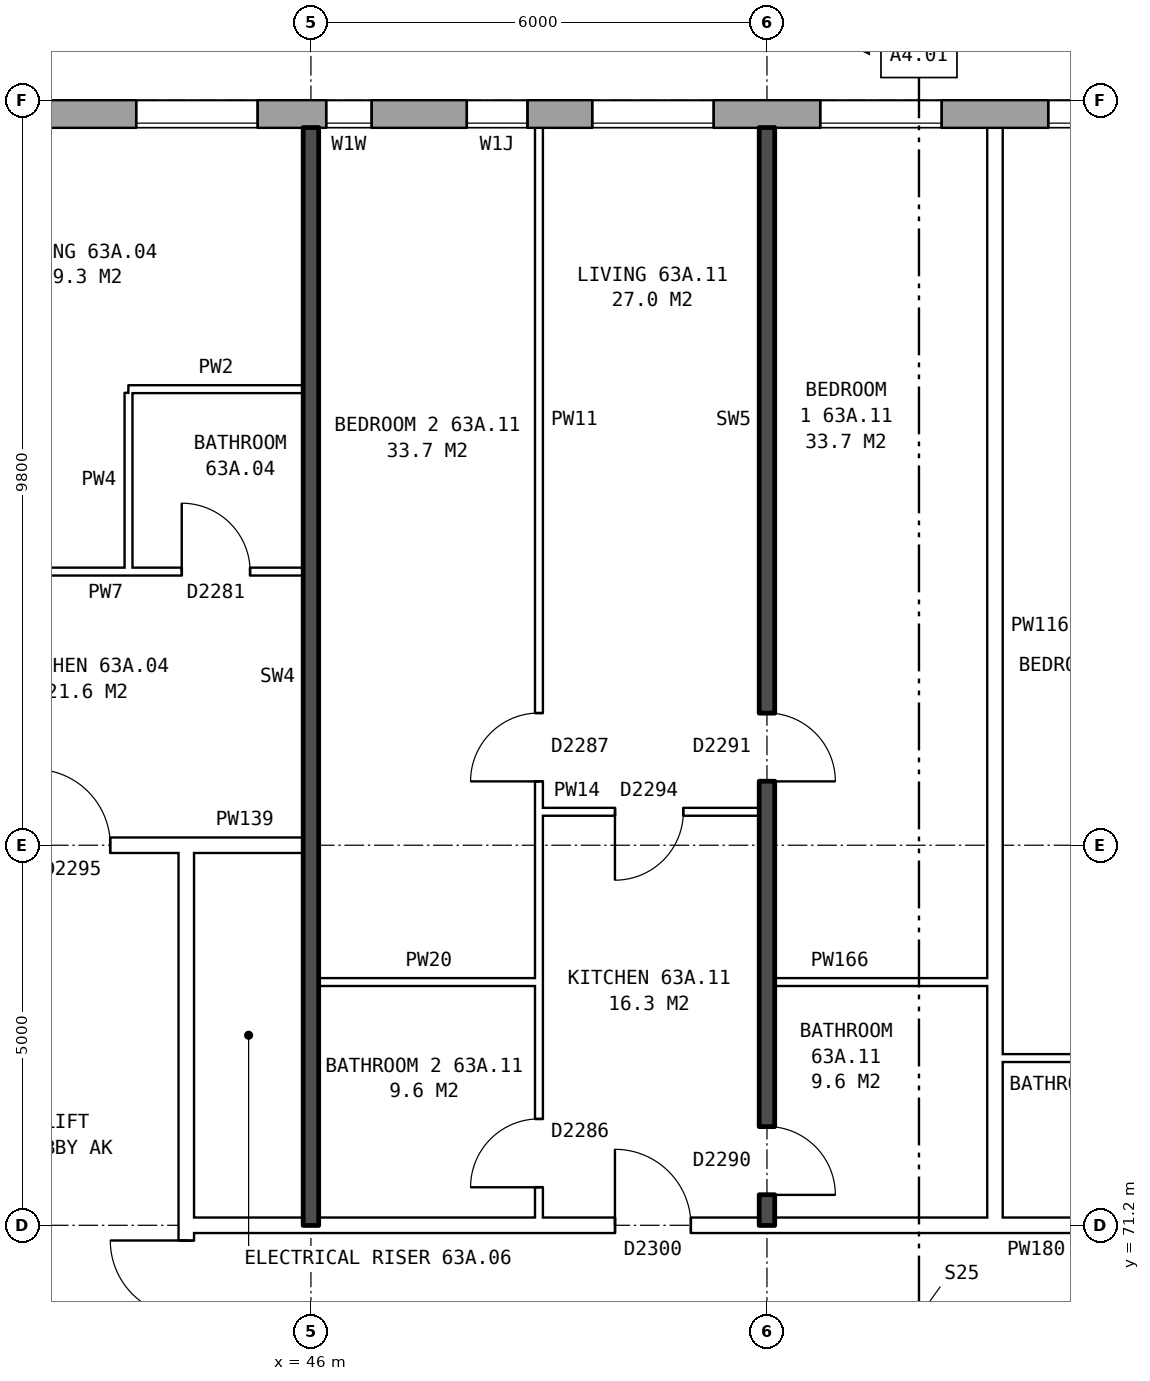
"""IFC4 building model, lengths in metres.
Left out: names, types, materials, properties, quantities, classifications, styles, units other than length and angle.
Written with IfcOpenShell. Run it as: python <this file> out.ifc"""

import sys

from ifc_helpers import new_model, si_unit, direction, frame, frame_2d, origin, place, context, subcontext, project, spatial, rectangle, extrude, element, fill, save


model = new_model("IFC4")
c1 = context("Model", 3, precision=1e-05, world=origin(), true_north=direction((0.0, 1.0)))
c2 = subcontext(c1, "Body", "Model", "MODEL_VIEW")
j1 = project(units=[si_unit("LENGTHUNIT", "METRE"), si_unit("PLANEANGLEUNIT", "RADIAN")], contexts=[c1])
p1 = place(None, origin())
s1 = spatial("IfcSite", under=j1, at=p1, CompositionType="ELEMENT")
p2 = place(p1, origin())
s2 = spatial("IfcBuilding", under=s1, at=p2, CompositionType="ELEMENT")
p3 = place(p2, frame((0.0, 0.0, 224.5)))
s3 = spatial("IfcBuildingStorey", under=s2, at=p3, CompositionType="ELEMENT", Elevation=224.5)
p4 = place(p3, frame((74.95, 85.82, 0.0), z_axis=(0.0, 0.0, 1.0), x_axis=(-1.0, 0.0, 0.0)))
e1 = element("IfcWall", 1, at=p4, inside=s3, PredefinedType="STANDARD", context=c2, shape_type="SweptSolid", body=[
    extrude(rectangle(XDim=39.875, YDim=0.36, at=frame_2d((19.938, 0.0))), origin(), (0.0, 0.0, 1.0), 2.85),
])
p5 = place(p4, frame((2.65, 0.0, 0.8)))
e2 = element("IfcOpeningElement", 2, at=p5, cuts=e1, PredefinedType="OPENING", context=c2, shape_type="SweptSolid", body=[
    extrude(rectangle(XDim=1.6, YDim=1.8, at=frame_2d((0.8, 0.9))), frame((0.0, 0.19, 0.0), z_axis=(0.0, -1.0, 0.0), x_axis=(1.0, 0.0, 0.0)), (0.0, 0.0, 1.0), 0.38),
])
p6 = place(p4, frame((5.65, 0.0, 0.8)))
e3 = element("IfcOpeningElement", 3, at=p6, cuts=e1, PredefinedType="OPENING", context=c2, shape_type="SweptSolid", body=[
    extrude(rectangle(XDim=1.6, YDim=1.8, at=frame_2d((0.8, 0.9))), frame((0.0, 0.19, 0.0), z_axis=(0.0, -1.0, 0.0), x_axis=(1.0, 0.0, 0.0)), (0.0, 0.0, 1.0), 0.38),
])
p7 = place(p4, frame((8.65, 0.0, 0.8)))
e4 = element("IfcOpeningElement", 4, at=p7, cuts=e1, PredefinedType="OPENING", context=c2, shape_type="SweptSolid", body=[
    extrude(rectangle(XDim=1.6, YDim=1.8, at=frame_2d((0.8, 0.9))), frame((0.0, 0.19, 0.0), z_axis=(0.0, -1.0, 0.0), x_axis=(1.0, 0.0, 0.0)), (0.0, 0.0, 1.0), 0.38),
])
p8 = place(p4, frame((11.65, 0.0, 0.8)))
e5 = element("IfcOpeningElement", 5, at=p8, cuts=e1, PredefinedType="OPENING", context=c2, shape_type="SweptSolid", body=[
    extrude(rectangle(XDim=1.6, YDim=1.8, at=frame_2d((0.8, 0.9))), frame((0.0, 0.19, 0.0), z_axis=(0.0, -1.0, 0.0), x_axis=(1.0, 0.0, 0.0)), (0.0, 0.0, 1.0), 0.38),
])
p9 = place(p4, frame((15.55, 0.0, 0.8)))
e6 = element("IfcOpeningElement", 6, at=p9, cuts=e1, PredefinedType="OPENING", context=c2, shape_type="SweptSolid", body=[
    extrude(rectangle(XDim=1.2, YDim=1.8, at=frame_2d((0.6, 0.9))), frame((0.0, 0.19, 0.0), z_axis=(0.0, -1.0, 0.0), x_axis=(1.0, 0.0, 0.0)), (0.0, 0.0, 1.0), 0.38),
])
p10 = place(p4, frame((17.65, 0.0, 0.8)))
e7 = element("IfcOpeningElement", 7, at=p10, cuts=e1, PredefinedType="OPENING", context=c2, shape_type="SweptSolid", body=[
    extrude(rectangle(XDim=1.6, YDim=1.8, at=frame_2d((0.8, 0.9))), frame((0.0, 0.19, 0.0), z_axis=(0.0, -1.0, 0.0), x_axis=(1.0, 0.0, 0.0)), (0.0, 0.0, 1.0), 0.38),
])
p11 = place(p4, frame((20.65, 0.0, 0.8)))
e8 = element("IfcOpeningElement", 8, at=p11, cuts=e1, PredefinedType="OPENING", context=c2, shape_type="SweptSolid", body=[
    extrude(rectangle(XDim=1.6, YDim=1.8, at=frame_2d((0.8, 0.9))), frame((0.0, 0.19, 0.0), z_axis=(0.0, -1.0, 0.0), x_axis=(1.0, 0.0, 0.0)), (0.0, 0.0, 1.0), 0.38),
])
p12 = place(p4, frame((23.65, 0.0, 0.8)))
e9 = element("IfcOpeningElement", 9, at=p12, cuts=e1, PredefinedType="OPENING", context=c2, shape_type="SweptSolid", body=[
    extrude(rectangle(XDim=1.6, YDim=1.8, at=frame_2d((0.8, 0.9))), frame((0.0, 0.19, 0.0), z_axis=(0.0, -1.0, 0.0), x_axis=(1.0, 0.0, 0.0)), (0.0, 0.0, 1.0), 0.38),
])
p13 = place(p4, frame((26.1, 0.0, 0.25)))
e10 = element("IfcOpeningElement", 10, at=p13, cuts=e1, PredefinedType="OPENING", context=c2, shape_type="SweptSolid", body=[
    extrude(rectangle(XDim=0.8, YDim=1.5, at=frame_2d((0.4, 0.75))), frame((0.0, 0.19, 0.0), z_axis=(0.0, -1.0, 0.0), x_axis=(1.0, 0.0, 0.0)), (0.0, 0.0, 1.0), 0.38),
])
p14 = place(p4, frame((29.65, 0.0, 0.8)))
e11 = element("IfcOpeningElement", 11, at=p14, cuts=e1, PredefinedType="OPENING", context=c2, shape_type="SweptSolid", body=[
    extrude(rectangle(XDim=1.6, YDim=1.8, at=frame_2d((0.8, 0.9))), frame((0.0, 0.19, 0.0), z_axis=(0.0, -1.0, 0.0), x_axis=(1.0, 0.0, 0.0)), (0.0, 0.0, 1.0), 0.38),
])
p15 = place(p4, frame((32.65, 0.0, 0.8)))
e12 = element("IfcOpeningElement", 12, at=p15, cuts=e1, PredefinedType="OPENING", context=c2, shape_type="SweptSolid", body=[
    extrude(rectangle(XDim=1.6, YDim=1.8, at=frame_2d((0.8, 0.9))), frame((0.0, 0.19, 0.0), z_axis=(0.0, -1.0, 0.0), x_axis=(1.0, 0.0, 0.0)), (0.0, 0.0, 1.0), 0.38),
])
p16 = place(p4, frame((35.65, 0.0, 0.8)))
e13 = element("IfcOpeningElement", 13, at=p16, cuts=e1, PredefinedType="OPENING", context=c2, shape_type="SweptSolid", body=[
    extrude(rectangle(XDim=1.6, YDim=1.8, at=frame_2d((0.8, 0.9))), frame((0.0, 0.19, 0.0), z_axis=(0.0, -1.0, 0.0), x_axis=(1.0, 0.0, 0.0)), (0.0, 0.0, 1.0), 0.38),
])
p17 = place(p4, frame((28.15, 0.0, 1.65)))
e14 = element("IfcOpeningElement", 14, at=p17, cuts=e1, PredefinedType="OPENING", context=c2, shape_type="SweptSolid", body=[
    extrude(rectangle(XDim=0.6, YDim=0.9, at=frame_2d((0.3, 0.45))), frame((0.0, 0.19, 0.0), z_axis=(0.0, -1.0, 0.0), x_axis=(1.0, 0.0, 0.0)), (0.0, 0.0, 1.0), 0.38),
])
p18 = place(p3, frame((44.36, 63.9, 0.0), z_axis=(0.0, 0.0, 1.0), x_axis=(0.0, 1.0, 0.0)))
e15 = element("IfcWall", 15, at=p18, inside=s3, PredefinedType="PARTITIONING", context=c2, shape_type="SweptSolid", body=[
    extrude(rectangle(XDim=12.2, YDim=0.2, at=frame_2d((6.1, 0.0))), origin(), (0.0, 0.0, 1.0), 2.85),
])
p19 = place(p18, frame((5.1, 0.0, 0.0)))
e16 = element("IfcOpeningElement", 16, at=p19, cuts=e15, PredefinedType="OPENING", context=c2, shape_type="SweptSolid", body=[
    extrude(rectangle(XDim=2.0, YDim=2.1, at=frame_2d((1.0, 1.05))), frame((0.0, 0.11, 0.0), z_axis=(0.0, -1.0, 0.0), x_axis=(1.0, 0.0, 0.0)), (0.0, 0.0, 1.0), 0.22),
])
p20 = place(p3, frame((44.36, 71.2, 0.0), z_axis=(0.0, 0.0, 1.0), x_axis=(1.0, 0.0, 0.0)))
e17 = element("IfcWall", 17, at=p20, inside=s3, PredefinedType="PARTITIONING", context=c2, shape_type="SweptSolid", body=[
    extrude(rectangle(XDim=19.28, YDim=0.2, at=frame_2d((9.64, 0.0))), origin(), (0.0, 0.0, 1.0), 2.85),
])
p21 = place(p20, frame((14.64, 0.0, 0.0)))
e18 = element("IfcOpeningElement", 18, at=p21, cuts=e17, PredefinedType="OPENING", context=c2, shape_type="SweptSolid", body=[
    extrude(rectangle(XDim=1.0, YDim=2.1, at=frame_2d((0.5, 1.05))), frame((0.0, 0.11, 0.0), z_axis=(0.0, -1.0, 0.0), x_axis=(1.0, 0.0, 0.0)), (0.0, 0.0, 1.0), 0.22),
])
p22 = place(p20, frame((5.64, 0.0, 0.0)))
e19 = element("IfcOpeningElement", 19, at=p22, cuts=e17, PredefinedType="OPENING", context=c2, shape_type="SweptSolid", body=[
    extrude(rectangle(XDim=1.0, YDim=2.1, at=frame_2d((0.5, 1.05))), frame((0.0, 0.11, 0.0), z_axis=(0.0, -1.0, 0.0), x_axis=(1.0, 0.0, 0.0)), (0.0, 0.0, 1.0), 0.22),
])
p23 = place(p3, frame((55.1, 73.4, 0.0), z_axis=(0.0, 0.0, 1.0), x_axis=(1.0, 0.0, 0.0)))
e20 = element("IfcWall", 20, at=p23, inside=s3, PredefinedType="PARTITIONING", context=c2, shape_type="SweptSolid", body=[
    extrude(rectangle(XDim=2.8, YDim=0.1, at=frame_2d((1.4, 0.0))), origin(), (0.0, 0.0, 1.0), 2.85),
])
p24 = place(p3, frame((46.1, 74.4, 0.0), z_axis=(0.0, 0.0, 1.0), x_axis=(1.0, 0.0, 0.0)))
e21 = element("IfcWall", 21, at=p24, inside=s3, PredefinedType="PARTITIONING", context=c2, shape_type="SweptSolid", body=[
    extrude(rectangle(XDim=2.9, YDim=0.1, at=frame_2d((1.45, 0.0))), origin(), (0.0, 0.0, 1.0), 2.85),
])
p25 = place(p3, frame((52.1, 74.4, 0.0), z_axis=(0.0, 0.0, 1.0), x_axis=(1.0, 0.0, 0.0)))
e22 = element("IfcWall", 22, at=p25, inside=s3, PredefinedType="PARTITIONING", context=c2, shape_type="SweptSolid", body=[
    extrude(rectangle(XDim=2.8, YDim=0.1, at=frame_2d((1.4, 0.0))), origin(), (0.0, 0.0, 1.0), 2.85),
])
p26 = place(p3, frame((41.36, 76.2, 0.0), z_axis=(0.0, 0.0, 1.0), x_axis=(1.0, 0.0, 0.0)))
e23 = element("IfcWall", 23, at=p26, inside=s3, PredefinedType="PARTITIONING", context=c2, shape_type="SweptSolid", body=[
    extrude(rectangle(XDim=3.0, YDim=0.2, at=frame_2d((1.5, 0.0))), origin(), (0.0, 0.0, 1.0), 2.85),
])
p27 = place(p26, frame((1.0, 0.0, 0.0)))
e24 = element("IfcOpeningElement", 24, at=p27, cuts=e23, PredefinedType="OPENING", context=c2, shape_type="SweptSolid", body=[
    extrude(rectangle(XDim=1.0, YDim=2.1, at=frame_2d((0.5, 1.05))), frame((0.0, 0.11, 0.0), z_axis=(0.0, -1.0, 0.0), x_axis=(1.0, 0.0, 0.0)), (0.0, 0.0, 1.0), 0.22),
])
p28 = place(p3, frame((44.36, 76.2, 0.0), z_axis=(0.0, 0.0, 1.0), x_axis=(1.0, 0.0, 0.0)))
e25 = element("IfcWall", 25, at=p28, inside=s3, PredefinedType="PARTITIONING", context=c2, shape_type="SweptSolid", body=[
    extrude(rectangle(XDim=1.54, YDim=0.2, at=frame_2d((0.77, 0.0))), origin(), (0.0, 0.0, 1.0), 2.85),
])
p29 = place(p3, frame((49.0, 76.64, 0.0), z_axis=(0.0, 0.0, 1.0), x_axis=(1.0, 0.0, 0.0)))
e26 = element("IfcWall", 26, at=p29, inside=s3, PredefinedType="PARTITIONING", context=c2, shape_type="SweptSolid", body=[
    extrude(rectangle(XDim=2.9, YDim=0.1, at=frame_2d((1.45, 0.0))), origin(), (0.0, 0.0, 1.0), 2.85),
])
p30 = place(p29, frame((1.0, 0.0, 0.0)))
e27 = element("IfcOpeningElement", 27, at=p30, cuts=e26, PredefinedType="OPENING", context=c2, shape_type="SweptSolid", body=[
    extrude(rectangle(XDim=0.9, YDim=2.1, at=frame_2d((0.45, 1.05))), frame((0.0, 0.06, 0.0), z_axis=(0.0, -1.0, 0.0), x_axis=(1.0, 0.0, 0.0)), (0.0, 0.0, 1.0), 0.12),
])
p31 = place(p3, frame((40.1, 79.8, 0.0), z_axis=(0.0, 0.0, 1.0), x_axis=(1.0, 0.0, 0.0)))
e28 = element("IfcWall", 28, at=p31, inside=s3, PredefinedType="PARTITIONING", context=c2, shape_type="SweptSolid", body=[
    extrude(rectangle(XDim=5.8, YDim=0.1, at=frame_2d((2.9, 0.0))), origin(), (0.0, 0.0, 1.0), 2.85),
])
p32 = place(p31, frame((1.3, 0.0, 0.0)))
e29 = element("IfcOpeningElement", 29, at=p32, cuts=e28, PredefinedType="OPENING", context=c2, shape_type="SweptSolid", body=[
    extrude(rectangle(XDim=0.9, YDim=2.1, at=frame_2d((0.45, 1.05))), frame((0.0, 0.06, 0.0), z_axis=(0.0, -1.0, 0.0), x_axis=(1.0, 0.0, 0.0)), (0.0, 0.0, 1.0), 0.12),
])
p33 = place(p31, frame((4.2, 0.0, 0.0)))
e30 = element("IfcOpeningElement", 30, at=p33, cuts=e28, PredefinedType="OPENING", context=c2, shape_type="SweptSolid", body=[
    extrude(rectangle(XDim=0.9, YDim=2.1, at=frame_2d((0.45, 1.05))), frame((0.0, 0.06, 0.0), z_axis=(0.0, -1.0, 0.0), x_axis=(1.0, 0.0, 0.0)), (0.0, 0.0, 1.0), 0.12),
])
for number, where, z_axis, x_axis in (
    (31, (43.6, 82.2, 0.0), (0.0, 0.0, 1.0), (1.0, 0.0, 0.0)),
    (32, (43.6, 79.85, 0.0), (0.0, 0.0, 1.0), (0.0, 1.0, 0.0)),
):
    element("IfcWall", number, at=place(p3, frame(where, z_axis=z_axis, x_axis=x_axis)), inside=s3, PredefinedType="PARTITIONING", context=c2, shape_type="SweptSolid", body=[
        extrude(rectangle(XDim=2.3, YDim=0.1, at=frame_2d((1.15, 0.0))), origin(), (0.0, 0.0, 1.0), 2.85),
    ])
p34 = place(p3, frame((46.0, 71.2, 0.0), z_axis=(0.0, 0.0, 1.0), x_axis=(0.0, 1.0, 0.0)))
e33 = element("IfcWall", 33, at=p34, inside=s3, PredefinedType="SOLIDWALL", context=c2, shape_type="SweptSolid", body=[
    extrude(rectangle(XDim=14.44, YDim=0.2, at=frame_2d((7.22, 0.0))), origin(), (0.0, 0.0, 1.0), 2.85),
])
p35 = place(p3, frame((49.0, 71.3, 0.0), z_axis=(0.0, 0.0, 1.0), x_axis=(0.0, 1.0, 0.0)))
e34 = element("IfcWall", 34, at=p35, inside=s3, PredefinedType="PARTITIONING", context=c2, shape_type="SweptSolid", body=[
    extrude(rectangle(XDim=14.34, YDim=0.1, at=frame_2d((7.17, 0.0))), origin(), (0.0, 0.0, 1.0), 2.85),
])
p36 = place(p35, frame((5.74, 0.0, 0.0)))
e35 = element("IfcOpeningElement", 35, at=p36, cuts=e34, PredefinedType="OPENING", context=c2, shape_type="SweptSolid", body=[
    extrude(rectangle(XDim=0.9, YDim=2.1, at=frame_2d((0.45, 1.05))), frame((0.0, 0.06, 0.0), z_axis=(0.0, -1.0, 0.0), x_axis=(1.0, 0.0, 0.0)), (0.0, 0.0, 1.0), 0.12),
])
p37 = place(p35, frame((0.4, 0.0, 0.0)))
e36 = element("IfcOpeningElement", 36, at=p37, cuts=e34, PredefinedType="OPENING", context=c2, shape_type="SweptSolid", body=[
    extrude(rectangle(XDim=0.9, YDim=2.1, at=frame_2d((0.45, 1.05))), frame((0.0, 0.06, 0.0), z_axis=(0.0, -1.0, 0.0), x_axis=(1.0, 0.0, 0.0)), (0.0, 0.0, 1.0), 0.12),
])
p38 = place(p3, frame((52.0, 71.2, 0.0), z_axis=(0.0, 0.0, 1.0), x_axis=(0.0, 1.0, 0.0)))
e37 = element("IfcWall", 37, at=p38, inside=s3, PredefinedType="SOLIDWALL", context=c2, shape_type="SweptSolid", body=[
    extrude(rectangle(XDim=14.44, YDim=0.2, at=frame_2d((7.22, 0.0))), origin(), (0.0, 0.0, 1.0), 2.85),
])
p39 = place(p38, frame((5.84, 0.0, 0.0)))
e38 = element("IfcOpeningElement", 38, at=p39, cuts=e37, PredefinedType="OPENING", context=c2, shape_type="SweptSolid", body=[
    extrude(rectangle(XDim=0.9, YDim=2.1, at=frame_2d((0.45, 1.05))), frame((0.0, 0.11, 0.0), z_axis=(0.0, -1.0, 0.0), x_axis=(1.0, 0.0, 0.0)), (0.0, 0.0, 1.0), 0.22),
])
p40 = place(p38, frame((0.4, 0.0, 0.0)))
e39 = element("IfcOpeningElement", 39, at=p40, cuts=e37, PredefinedType="OPENING", context=c2, shape_type="SweptSolid", body=[
    extrude(rectangle(XDim=0.9, YDim=2.1, at=frame_2d((0.45, 1.05))), frame((0.0, 0.11, 0.0), z_axis=(0.0, -1.0, 0.0), x_axis=(1.0, 0.0, 0.0)), (0.0, 0.0, 1.0), 0.22),
])
p41 = place(p3, frame((55.0, 71.3, 0.0), z_axis=(0.0, 0.0, 1.0), x_axis=(0.0, 1.0, 0.0)))
e40 = element("IfcWall", 40, at=p41, inside=s3, PredefinedType="PARTITIONING", context=c2, shape_type="SweptSolid", body=[
    extrude(rectangle(XDim=14.34, YDim=0.2, at=frame_2d((7.17, 0.0))), origin(), (0.0, 0.0, 1.0), 2.85),
])
p42 = place(p10, origin())
e41 = element("IfcWindow", 41, at=p42, inside=s3, PartitioningType="SINGLE_PANEL", PredefinedType="WINDOW", context=c2, shape_type="SweptSolid", body=[
    extrude(rectangle(XDim=1.6, YDim=1.8, at=frame_2d((0.8, 0.9))), frame((0.0, 0.15, 0.0), z_axis=(0.0, -1.0, 0.0), x_axis=(1.0, 0.0, 0.0)), (0.0, 0.0, 1.0), 0.06),
])
fill(e7, e41)
p43 = place(p11, origin())
e42 = element("IfcWindow", 42, at=p43, inside=s3, PartitioningType="SINGLE_PANEL", PredefinedType="WINDOW", context=c2, shape_type="SweptSolid", body=[
    extrude(rectangle(XDim=1.6, YDim=1.8, at=frame_2d((0.8, 0.9))), frame((0.0, 0.15, 0.0), z_axis=(0.0, -1.0, 0.0), x_axis=(1.0, 0.0, 0.0)), (0.0, 0.0, 1.0), 0.06),
])
fill(e8, e42)
p44 = place(p12, origin())
e43 = element("IfcWindow", 43, at=p44, inside=s3, PartitioningType="SINGLE_PANEL", PredefinedType="WINDOW", context=c2, shape_type="SweptSolid", body=[
    extrude(rectangle(XDim=1.6, YDim=1.8, at=frame_2d((0.8, 0.9))), frame((0.0, 0.15, 0.0), z_axis=(0.0, -1.0, 0.0), x_axis=(1.0, 0.0, 0.0)), (0.0, 0.0, 1.0), 0.06),
])
fill(e9, e43)
p45 = place(p13, origin())
e44 = element("IfcWindow", 44, at=p45, inside=s3, PartitioningType="SINGLE_PANEL", PredefinedType="WINDOW", context=c2, shape_type="SweptSolid", body=[
    extrude(rectangle(XDim=0.8, YDim=1.5, at=frame_2d((0.4, 0.75))), frame((0.0, 0.15, 0.0), z_axis=(0.0, -1.0, 0.0), x_axis=(1.0, 0.0, 0.0)), (0.0, 0.0, 1.0), 0.06),
])
fill(e10, e44)
p46 = place(p14, origin())
e45 = element("IfcWindow", 45, at=p46, inside=s3, PartitioningType="SINGLE_PANEL", PredefinedType="WINDOW", context=c2, shape_type="SweptSolid", body=[
    extrude(rectangle(XDim=1.6, YDim=1.8, at=frame_2d((0.8, 0.9))), frame((0.0, 0.15, 0.0), z_axis=(0.0, -1.0, 0.0), x_axis=(1.0, 0.0, 0.0)), (0.0, 0.0, 1.0), 0.06),
])
fill(e11, e45)
p47 = place(p19, origin())
e46 = element("IfcDoor", 46, at=p47, inside=s3, OperationType="DOUBLE_DOOR_SINGLE_SWING", PredefinedType="DOOR", context=c2, shape_type="SweptSolid", body=[
    extrude(rectangle(XDim=2.0, YDim=2.1, at=frame_2d((1.0, 1.05))), frame((0.0, 0.025, 0.0), z_axis=(0.0, -1.0, 0.0), x_axis=(1.0, 0.0, 0.0)), (0.0, 0.0, 1.0), 0.05),
])
fill(e16, e46)
p48 = place(p27, origin())
e47 = element("IfcDoor", 47, at=p48, inside=s3, OperationType="SINGLE_SWING_LEFT", PredefinedType="DOOR", context=c2, shape_type="SweptSolid", body=[
    extrude(rectangle(XDim=1.0, YDim=2.1, at=frame_2d((0.5, 1.05))), frame((0.0, 0.025, 0.0), z_axis=(0.0, -1.0, 0.0), x_axis=(1.0, 0.0, 0.0)), (0.0, 0.0, 1.0), 0.05),
])
fill(e24, e47)
p49 = place(p33, origin())
e48 = element("IfcDoor", 48, at=p49, inside=s3, OperationType="SINGLE_SWING_LEFT", PredefinedType="DOOR", context=c2, shape_type="SweptSolid", body=[
    extrude(rectangle(XDim=0.9, YDim=2.1, at=frame_2d((0.45, 1.05))), frame((0.0, 0.025, 0.0), z_axis=(0.0, -1.0, 0.0), x_axis=(1.0, 0.0, 0.0)), (0.0, 0.0, 1.0), 0.05),
])
fill(e30, e48)
p50 = place(p39, frame((0.9, 0.0, 0.0), z_axis=(0.0, 0.0, 1.0), x_axis=(-1.0, 0.0, 0.0)))
e49 = element("IfcDoor", 49, at=p50, inside=s3, OperationType="SINGLE_SWING_RIGHT", PredefinedType="DOOR", context=c2, shape_type="SweptSolid", body=[
    extrude(rectangle(XDim=0.9, YDim=2.1, at=frame_2d((0.45, 1.05))), frame((0.0, 0.025, 0.0), z_axis=(0.0, -1.0, 0.0), x_axis=(1.0, 0.0, 0.0)), (0.0, 0.0, 1.0), 0.05),
])
fill(e38, e49)
p51 = place(p36, origin())
e50 = element("IfcDoor", 50, at=p51, inside=s3, OperationType="SINGLE_SWING_LEFT", PredefinedType="DOOR", context=c2, shape_type="SweptSolid", body=[
    extrude(rectangle(XDim=0.9, YDim=2.1, at=frame_2d((0.45, 1.05))), frame((0.0, 0.025, 0.0), z_axis=(0.0, -1.0, 0.0), x_axis=(1.0, 0.0, 0.0)), (0.0, 0.0, 1.0), 0.05),
])
fill(e35, e50)
p52 = place(p22, origin())
e51 = element("IfcDoor", 51, at=p52, inside=s3, OperationType="SINGLE_SWING_LEFT", PredefinedType="DOOR", context=c2, shape_type="SweptSolid", body=[
    extrude(rectangle(XDim=1.0, YDim=2.1, at=frame_2d((0.5, 1.05))), frame((0.0, 0.025, 0.0), z_axis=(0.0, -1.0, 0.0), x_axis=(1.0, 0.0, 0.0)), (0.0, 0.0, 1.0), 0.05),
])
fill(e19, e51)
p53 = place(p30, frame((0.9, 0.0, 0.0), z_axis=(0.0, 0.0, 1.0), x_axis=(-1.0, 0.0, 0.0)))
e52 = element("IfcDoor", 52, at=p53, inside=s3, OperationType="SINGLE_SWING_RIGHT", PredefinedType="DOOR", context=c2, shape_type="SweptSolid", body=[
    extrude(rectangle(XDim=0.9, YDim=2.1, at=frame_2d((0.45, 1.05))), frame((0.0, 0.025, 0.0), z_axis=(0.0, -1.0, 0.0), x_axis=(1.0, 0.0, 0.0)), (0.0, 0.0, 1.0), 0.05),
])
fill(e27, e52)
p54 = place(p40, frame((0.9, 0.0, 0.0), z_axis=(0.0, 0.0, 1.0), x_axis=(-1.0, 0.0, 0.0)))
e53 = element("IfcDoor", 53, at=p54, inside=s3, OperationType="SINGLE_SWING_RIGHT", PredefinedType="DOOR", context=c2, shape_type="SweptSolid", body=[
    extrude(rectangle(XDim=0.9, YDim=2.1, at=frame_2d((0.45, 1.05))), frame((0.0, 0.025, 0.0), z_axis=(0.0, -1.0, 0.0), x_axis=(1.0, 0.0, 0.0)), (0.0, 0.0, 1.0), 0.05),
])
fill(e39, e53)
p55 = place(p37, origin())
e54 = element("IfcDoor", 54, at=p55, inside=s3, OperationType="SINGLE_SWING_LEFT", PredefinedType="DOOR", context=c2, shape_type="SweptSolid", body=[
    extrude(rectangle(XDim=0.9, YDim=2.1, at=frame_2d((0.45, 1.05))), frame((0.0, 0.025, 0.0), z_axis=(0.0, -1.0, 0.0), x_axis=(1.0, 0.0, 0.0)), (0.0, 0.0, 1.0), 0.05),
])
fill(e36, e54)
p56 = place(p17, origin())
e55 = element("IfcWindow", 55, at=p56, inside=s3, PartitioningType="SINGLE_PANEL", PredefinedType="WINDOW", context=c2, shape_type="SweptSolid", body=[
    extrude(rectangle(XDim=0.6, YDim=0.9, at=frame_2d((0.3, 0.45))), frame((0.0, 0.15, 0.0), z_axis=(0.0, -1.0, 0.0), x_axis=(1.0, 0.0, 0.0)), (0.0, 0.0, 1.0), 0.06),
])
fill(e14, e55)
save(model, sys.argv[1])
